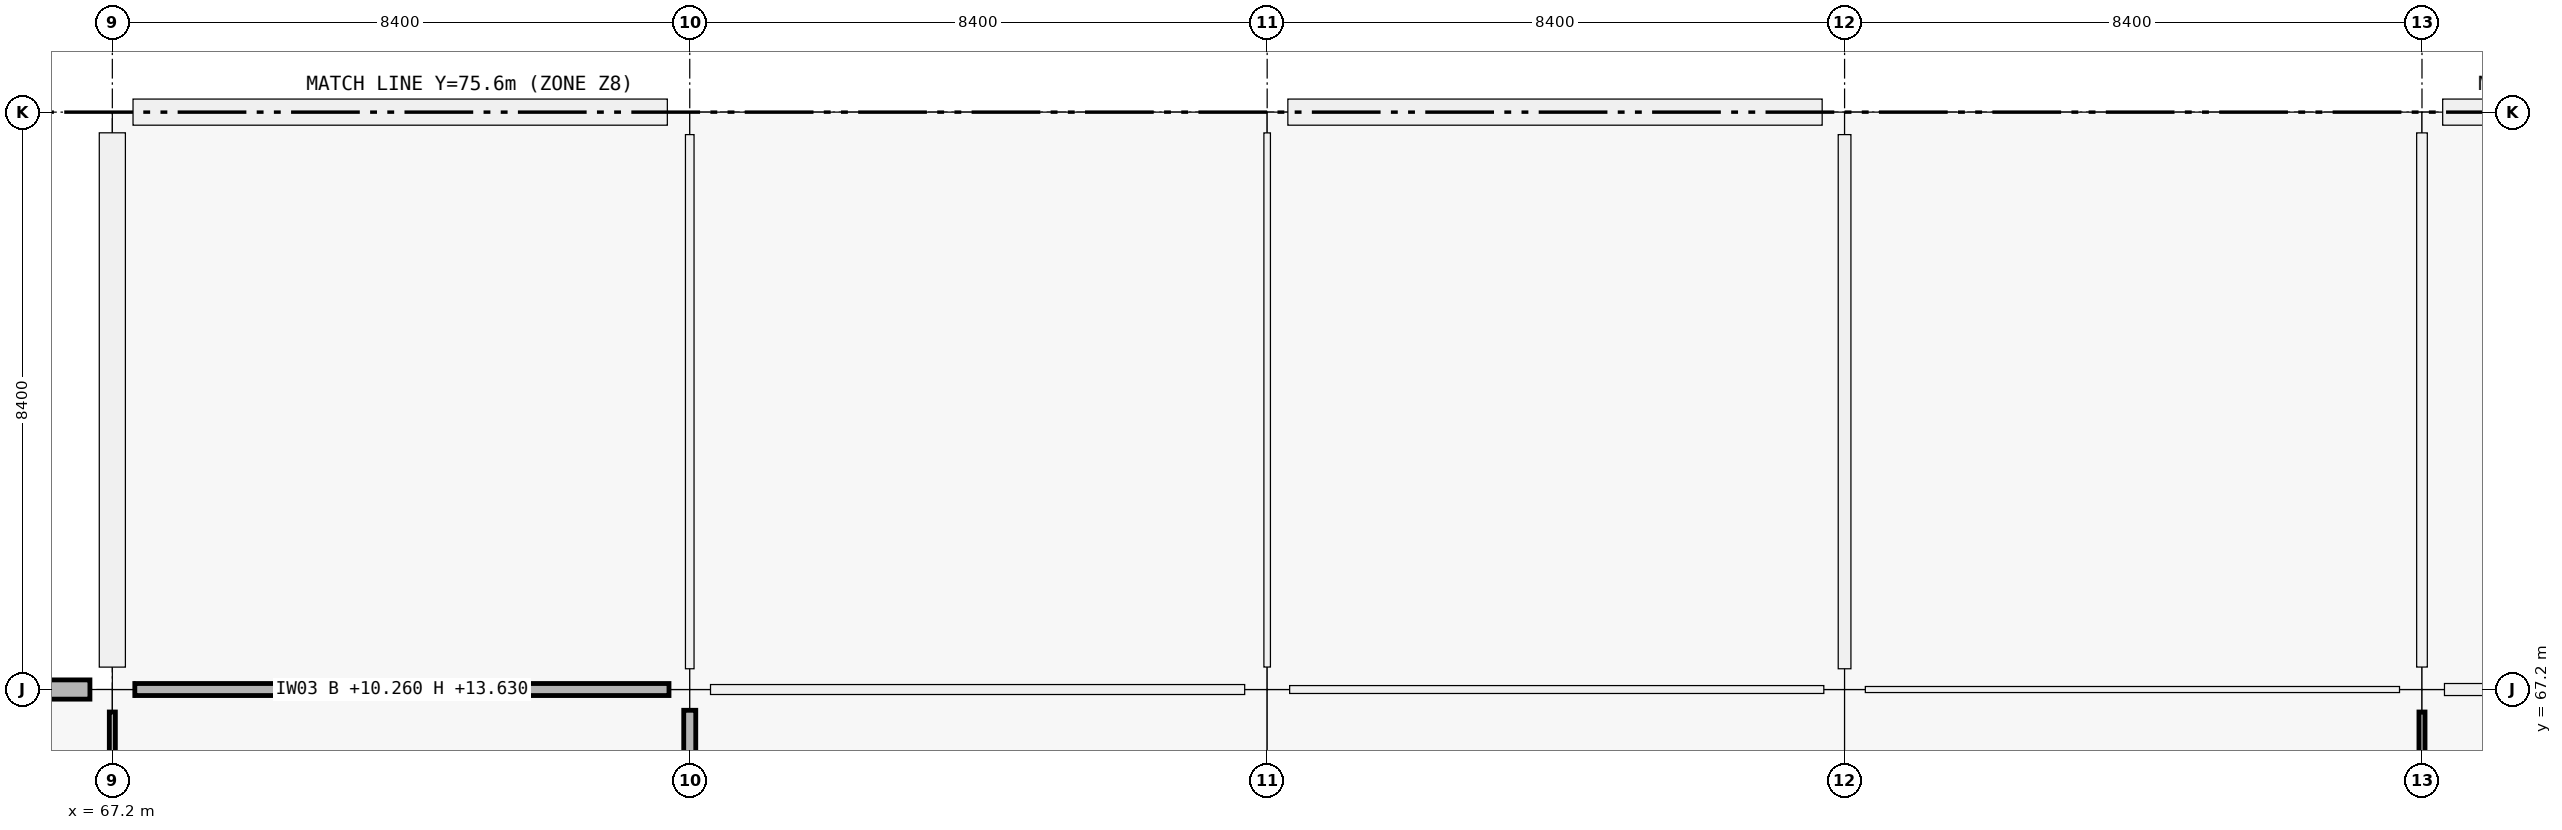
"""IFC4 building model, lengths in metres.
Left out: names, types, materials, properties, quantities, classifications, styles, units other than length and angle.
Written with IfcOpenShell. Run it as: python <this file> out.ifc"""

import sys

from ifc_helpers import new_model, si_unit, direction, frame, frame_2d, origin, origin_2d, place, context, subcontext, project, spatial, rectangle, extrude, element, fill, save


model = new_model("IFC4")
c1 = context("Model", 3, precision=1e-05, world=origin(), true_north=direction((0.0, 1.0)))
c2 = subcontext(c1, "Body", "Model", "MODEL_VIEW")
j1 = project(units=[si_unit("LENGTHUNIT", "METRE"), si_unit("PLANEANGLEUNIT", "RADIAN")], contexts=[c1])
p1 = place(None, origin())
s1 = spatial("IfcSite", under=j1, at=p1, CompositionType="ELEMENT")
p2 = place(p1, origin())
s2 = spatial("IfcBuilding", under=s1, at=p2, CompositionType="ELEMENT")
p3 = place(p2, frame((0.0, 0.0, 10.26)))
s3 = spatial("IfcBuildingStorey", under=s2, at=p3, CompositionType="ELEMENT", Elevation=10.26)
p4 = place(p3, frame((67.2, 67.2, 0.0), z_axis=(0.0, 0.0, 1.0), x_axis=(1.0, 0.0, 0.0)))
e1 = element("IfcColumn", 1, at=p4, inside=s3, PredefinedType="COLUMN", context=c2, shape_type="SweptSolid", body=[
    extrude(rectangle(XDim=0.65, YDim=0.65, at=origin_2d()), origin(), (0.0, 0.0, 1.0), 4.5),
])
for number, where, z_axis, x_axis in (
    (2, (67.2, 75.6, 0.0), (0.0, 0.0, 1.0), (1.0, 0.0, 0.0)),
    (3, (75.6, 67.2, 0.0), (0.0, 0.0, 1.0), (1.0, 0.0, 0.0)),
):
    element("IfcColumn", number, at=place(p3, frame(where, z_axis=z_axis, x_axis=x_axis)), inside=s3, PredefinedType="COLUMN", context=c2, shape_type="SweptSolid", body=[
        extrude(rectangle(XDim=0.6, YDim=0.6, at=origin_2d()), origin(), (0.0, 0.0, 1.0), 4.5),
    ])
for number, where, z_axis, x_axis in (
    (4, (75.6, 75.6, 0.0), (0.0, 0.0, 1.0), (1.0, 0.0, 0.0)),
    (5, (84.0, 67.2, 0.0), (0.0, 0.0, 1.0), (1.0, 0.0, 0.0)),
):
    element("IfcColumn", number, at=place(p3, frame(where, z_axis=z_axis, x_axis=x_axis)), inside=s3, PredefinedType="COLUMN", context=c2, shape_type="SweptSolid", body=[
        extrude(rectangle(XDim=0.65, YDim=0.65, at=origin_2d()), origin(), (0.0, 0.0, 1.0), 4.5),
    ])
for number, where, z_axis, x_axis in (
    (6, (84.0, 75.6, 0.0), (0.0, 0.0, 1.0), (1.0, 0.0, 0.0)),
    (7, (92.4, 67.2, 0.0), (0.0, 0.0, 1.0), (1.0, 0.0, 0.0)),
):
    element("IfcColumn", number, at=place(p3, frame(where, z_axis=z_axis, x_axis=x_axis)), inside=s3, PredefinedType="COLUMN", context=c2, shape_type="SweptSolid", body=[
        extrude(rectangle(XDim=0.6, YDim=0.6, at=origin_2d()), origin(), (0.0, 0.0, 1.0), 4.5),
    ])
for number, where, z_axis, x_axis in (
    (8, (92.4, 75.6, 0.0), (0.0, 0.0, 1.0), (1.0, 0.0, 0.0)),
    (9, (100.8, 67.2, 0.0), (0.0, 0.0, 1.0), (1.0, 0.0, 0.0)),
):
    element("IfcColumn", number, at=place(p3, frame(where, z_axis=z_axis, x_axis=x_axis)), inside=s3, PredefinedType="COLUMN", context=c2, shape_type="SweptSolid", body=[
        extrude(rectangle(XDim=0.65, YDim=0.65, at=origin_2d()), origin(), (0.0, 0.0, 1.0), 4.5),
    ])
p5 = place(p3, frame((100.8, 75.6, 0.0), z_axis=(0.0, 0.0, 1.0), x_axis=(1.0, 0.0, 0.0)))
e10 = element("IfcColumn", 10, at=p5, inside=s3, PredefinedType="COLUMN", context=c2, shape_type="SweptSolid", body=[
    extrude(rectangle(XDim=0.6, YDim=0.6, at=origin_2d()), origin(), (0.0, 0.0, 1.0), 4.5),
])
p6 = place(p3, frame((59.151, 67.2, 0.0), z_axis=(0.0, 0.0, 1.0), x_axis=(1.0, 0.0, 0.0)))
e11 = element("IfcWall", 11, at=p6, inside=s3, PredefinedType="SOLIDWALL", context=c2, shape_type="SweptSolid", body=[
    extrude(rectangle(XDim=7.723, YDim=0.28, at=frame_2d((3.862, 0.0))), origin(), (0.0, 0.0, 1.0), 3.54),
])
p7 = place(p6, frame((2.261, 0.0, 0.9)))
e12 = element("IfcOpeningElement", 12, at=p7, cuts=e11, PredefinedType="OPENING", context=c2, shape_type="SweptSolid", body=[
    extrude(rectangle(XDim=3.2, YDim=1.75, at=frame_2d((1.6, 0.875))), frame((0.0, 0.14, 0.0), z_axis=(0.0, -1.0, 0.0), x_axis=(1.0, 0.0, 0.0)), (0.0, 0.0, 1.0), 0.28),
])
p8 = place(p3, frame((67.2, 67.526, 0.0), z_axis=(0.0, 0.0, 1.0), x_axis=(0.0, 1.0, 0.0)))
e13 = element("IfcWall", 13, at=p8, inside=s3, PredefinedType="SOLIDWALL", context=c2, shape_type="SweptSolid", body=[
    extrude(rectangle(XDim=7.773, YDim=0.38, at=frame_2d((3.887, 0.0))), origin(), (0.0, 0.0, 1.0), 3.54),
])
p9 = place(p3, frame((67.501, 75.6, 0.0), z_axis=(0.0, 0.0, 1.0), x_axis=(1.0, 0.0, 0.0)))
e14 = element("IfcWall", 14, at=p9, inside=s3, PredefinedType="SOLIDWALL", context=c2, shape_type="SweptSolid", body=[
    extrude(rectangle(XDim=7.773, YDim=0.38, at=frame_2d((3.886, 0.0))), origin(), (0.0, 0.0, 1.0), 3.54),
])
p10 = place(p3, frame((84.301, 75.6, 0.0), z_axis=(0.0, 0.0, 1.0), x_axis=(1.0, 0.0, 0.0)))
e15 = element("IfcWall", 15, at=p10, inside=s3, PredefinedType="SOLIDWALL", context=c2, shape_type="SweptSolid", body=[
    extrude(rectangle(XDim=7.773, YDim=0.38, at=frame_2d((3.886, 0.0))), origin(), (0.0, 0.0, 1.0), 3.54),
])
p11 = place(p10, frame((3.136, 0.0, 1.55)))
e16 = element("IfcOpeningElement", 16, at=p11, cuts=e15, PredefinedType="OPENING", context=c2, shape_type="SweptSolid", body=[
    extrude(rectangle(XDim=1.5, YDim=1.2, at=frame_2d((0.75, 0.6))), frame((0.0, 0.19, 0.0), z_axis=(0.0, -1.0, 0.0), x_axis=(1.0, 0.0, 0.0)), (0.0, 0.0, 1.0), 0.38),
])
p12 = place(p3, frame((101.101, 75.6, 0.0), z_axis=(0.0, 0.0, 1.0), x_axis=(1.0, 0.0, 0.0)))
e17 = element("IfcWall", 17, at=p12, inside=s3, PredefinedType="SOLIDWALL", context=c2, shape_type="SweptSolid", body=[
    extrude(rectangle(XDim=7.773, YDim=0.38, at=frame_2d((3.886, 0.0))), origin(), (0.0, 0.0, 1.0), 3.54),
])
p13 = place(p3, frame((67.527, 67.2, 0.0), z_axis=(0.0, 0.0, 1.0), x_axis=(1.0, 0.0, 0.0)))
e18 = element("IfcWall", 18, at=p13, inside=s3, PredefinedType="PARTITIONING", context=c2, shape_type="SweptSolid", body=[
    extrude(rectangle(XDim=7.771, YDim=0.175, at=frame_2d((3.885, 0.0))), origin(), (0.0, 0.0, 1.0), 3.37),
])
p14 = place(p13, frame((3.085, 0.0, 0.0)))
e19 = element("IfcOpeningElement", 19, at=p14, cuts=e18, PredefinedType="OPENING", context=c2, shape_type="SweptSolid", body=[
    extrude(rectangle(XDim=1.6, YDim=2.3, at=frame_2d((0.8, 1.15))), frame((0.0, 0.087, 0.0), z_axis=(0.0, -1.0, 0.0), x_axis=(1.0, 0.0, 0.0)), (0.0, 0.0, 1.0), 0.175),
])
p15 = place(p3, frame((75.902, 67.2, 0.0), z_axis=(0.0, 0.0, 1.0), x_axis=(1.0, 0.0, 0.0)))
e20 = element("IfcWall", 20, at=p15, inside=s3, PredefinedType="PARTITIONING", context=c2, shape_type="SweptSolid", body=[
    extrude(rectangle(XDim=7.771, YDim=0.145, at=frame_2d((3.885, 0.0))), origin(), (0.0, 0.0, 1.0), 3.37),
])
p16 = place(p15, frame((3.16, 0.0, 0.0)))
e21 = element("IfcOpeningElement", 21, at=p16, cuts=e20, PredefinedType="OPENING", context=c2, shape_type="SweptSolid", body=[
    extrude(rectangle(XDim=1.45, YDim=2.2, at=frame_2d((0.725, 1.1))), frame((0.0, 0.073, 0.0), z_axis=(0.0, -1.0, 0.0), x_axis=(1.0, 0.0, 0.0)), (0.0, 0.0, 1.0), 0.145),
])
p17 = place(p3, frame((84.327, 67.2, 0.0), z_axis=(0.0, 0.0, 1.0), x_axis=(1.0, 0.0, 0.0)))
e22 = element("IfcWall", 22, at=p17, inside=s3, PredefinedType="PARTITIONING", context=c2, shape_type="SweptSolid", body=[
    extrude(rectangle(XDim=7.771, YDim=0.115, at=frame_2d((3.885, 0.0))), origin(), (0.0, 0.0, 1.0), 3.37),
])
p18 = place(p17, frame((3.21, 0.0, 0.0)))
e23 = element("IfcOpeningElement", 23, at=p18, cuts=e22, PredefinedType="OPENING", context=c2, shape_type="SweptSolid", body=[
    extrude(rectangle(XDim=1.35, YDim=2.2, at=frame_2d((0.675, 1.1))), frame((0.0, 0.058, 0.0), z_axis=(0.0, -1.0, 0.0), x_axis=(1.0, 0.0, 0.0)), (0.0, 0.0, 1.0), 0.115),
])
p19 = place(p3, frame((92.702, 67.2, 0.0), z_axis=(0.0, 0.0, 1.0), x_axis=(1.0, 0.0, 0.0)))
e24 = element("IfcWall", 24, at=p19, inside=s3, PredefinedType="PARTITIONING", context=c2, shape_type="SweptSolid", body=[
    extrude(rectangle(XDim=7.771, YDim=0.088, at=frame_2d((3.885, 0.0))), origin(), (0.0, 0.0, 1.0), 3.37),
])
p20 = place(p19, frame((3.085, 0.0, 0.0)))
e25 = element("IfcOpeningElement", 25, at=p20, cuts=e24, PredefinedType="OPENING", context=c2, shape_type="SweptSolid", body=[
    extrude(rectangle(XDim=1.6, YDim=2.3, at=frame_2d((0.8, 1.15))), frame((0.0, 0.044, 0.0), z_axis=(0.0, -1.0, 0.0), x_axis=(1.0, 0.0, 0.0)), (0.0, 0.0, 1.0), 0.088),
])
p21 = place(p3, frame((101.127, 67.2, 0.0), z_axis=(0.0, 0.0, 1.0), x_axis=(1.0, 0.0, 0.0)))
e26 = element("IfcWall", 26, at=p21, inside=s3, PredefinedType="PARTITIONING", context=c2, shape_type="SweptSolid", body=[
    extrude(rectangle(XDim=7.771, YDim=0.175, at=frame_2d((3.885, 0.0))), origin(), (0.0, 0.0, 1.0), 3.37),
])
p22 = place(p21, frame((3.186, 0.0, 0.0)))
e27 = element("IfcOpeningElement", 27, at=p22, cuts=e26, PredefinedType="OPENING", context=c2, shape_type="SweptSolid", body=[
    extrude(rectangle(XDim=1.4, YDim=2.25, at=frame_2d((0.7, 1.125))), frame((0.0, 0.087, 0.0), z_axis=(0.0, -1.0, 0.0), x_axis=(1.0, 0.0, 0.0)), (0.0, 0.0, 1.0), 0.175),
])
p23 = place(p3, frame((67.2, 59.102, 0.0), z_axis=(0.0, 0.0, 1.0), x_axis=(0.0, 1.0, 0.0)))
e28 = element("IfcWall", 28, at=p23, inside=s3, PredefinedType="PARTITIONING", context=c2, shape_type="SweptSolid", body=[
    extrude(rectangle(XDim=7.771, YDim=0.088, at=frame_2d((3.885, 0.0))), origin(), (0.0, 0.0, 1.0), 3.37),
])
p24 = place(p23, frame((3.415, 0.0, 0.0)))
e29 = element("IfcOpeningElement", 29, at=p24, cuts=e28, PredefinedType="OPENING", context=c2, shape_type="SweptSolid", body=[
    extrude(rectangle(XDim=0.94, YDim=2.15, at=frame_2d((0.47, 1.075))), frame((0.0, 0.044, 0.0), z_axis=(0.0, -1.0, 0.0), x_axis=(1.0, 0.0, 0.0)), (0.0, 0.0, 1.0), 0.088),
])
p25 = place(p3, frame((75.6, 59.127, 0.0), z_axis=(0.0, 0.0, 1.0), x_axis=(0.0, 1.0, 0.0)))
e30 = element("IfcWall", 30, at=p25, inside=s3, PredefinedType="PARTITIONING", context=c2, shape_type="SweptSolid", body=[
    extrude(rectangle(XDim=7.771, YDim=0.175, at=frame_2d((3.885, 0.0))), origin(), (0.0, 0.0, 1.0), 3.37),
])
p26 = place(p25, frame((2.986, 0.0, 0.0)))
e31 = element("IfcOpeningElement", 31, at=p26, cuts=e30, PredefinedType="OPENING", context=c2, shape_type="SweptSolid", body=[
    extrude(rectangle(XDim=1.8, YDim=2.4, at=frame_2d((0.9, 1.2))), frame((0.0, 0.087, 0.0), z_axis=(0.0, -1.0, 0.0), x_axis=(1.0, 0.0, 0.0)), (0.0, 0.0, 1.0), 0.175),
])
p27 = place(p3, frame((75.6, 67.502, 0.0), z_axis=(0.0, 0.0, 1.0), x_axis=(0.0, 1.0, 0.0)))
e32 = element("IfcWall", 32, at=p27, inside=s3, PredefinedType="PARTITIONING", context=c2, shape_type="SweptSolid", body=[
    extrude(rectangle(XDim=7.771, YDim=0.125, at=frame_2d((3.885, 0.0))), origin(), (0.0, 0.0, 1.0), 3.37),
])
p28 = place(p27, frame((3.425, 0.0, 0.0)))
e33 = element("IfcOpeningElement", 33, at=p28, cuts=e32, PredefinedType="OPENING", context=c2, shape_type="SweptSolid", body=[
    extrude(rectangle(XDim=0.92, YDim=2.15, at=frame_2d((0.46, 1.075))), frame((0.0, 0.062, 0.0), z_axis=(0.0, -1.0, 0.0), x_axis=(1.0, 0.0, 0.0)), (0.0, 0.0, 1.0), 0.125),
])
p29 = place(p3, frame((84.0, 67.527, 0.0), z_axis=(0.0, 0.0, 1.0), x_axis=(0.0, 1.0, 0.0)))
e34 = element("IfcWall", 34, at=p29, inside=s3, PredefinedType="PARTITIONING", context=c2, shape_type="SweptSolid", body=[
    extrude(rectangle(XDim=7.771, YDim=0.095, at=frame_2d((3.885, 0.0))), origin(), (0.0, 0.0, 1.0), 3.37),
])
p30 = place(p29, frame((3.361, 0.0, 0.0)))
e35 = element("IfcOpeningElement", 35, at=p30, cuts=e34, PredefinedType="OPENING", context=c2, shape_type="SweptSolid", body=[
    extrude(rectangle(XDim=1.05, YDim=2.12, at=frame_2d((0.525, 1.06))), frame((0.0, 0.047, 0.0), z_axis=(0.0, -1.0, 0.0), x_axis=(1.0, 0.0, 0.0)), (0.0, 0.0, 1.0), 0.095),
])
p31 = place(p3, frame((92.4, 67.502, 0.0), z_axis=(0.0, 0.0, 1.0), x_axis=(0.0, 1.0, 0.0)))
e36 = element("IfcWall", 36, at=p31, inside=s3, PredefinedType="PARTITIONING", context=c2, shape_type="SweptSolid", body=[
    extrude(rectangle(XDim=7.771, YDim=0.185, at=frame_2d((3.885, 0.0))), origin(), (0.0, 0.0, 1.0), 3.37),
])
p32 = place(p31, frame((3.381, 0.0, 0.0)))
e37 = element("IfcOpeningElement", 37, at=p32, cuts=e36, PredefinedType="OPENING", context=c2, shape_type="SweptSolid", body=[
    extrude(rectangle(XDim=1.01, YDim=2.12, at=frame_2d((0.505, 1.06))), frame((0.0, 0.093, 0.0), z_axis=(0.0, -1.0, 0.0), x_axis=(1.0, 0.0, 0.0)), (0.0, 0.0, 1.0), 0.185),
])
p33 = place(p3, frame((100.8, 59.102, 0.0), z_axis=(0.0, 0.0, 1.0), x_axis=(0.0, 1.0, 0.0)))
e38 = element("IfcWall", 38, at=p33, inside=s3, PredefinedType="PARTITIONING", context=c2, shape_type="SweptSolid", body=[
    extrude(rectangle(XDim=7.771, YDim=0.088, at=frame_2d((3.885, 0.0))), origin(), (0.0, 0.0, 1.0), 3.37),
])
p34 = place(p33, frame((3.085, 0.0, 0.0)))
e39 = element("IfcOpeningElement", 39, at=p34, cuts=e38, PredefinedType="OPENING", context=c2, shape_type="SweptSolid", body=[
    extrude(rectangle(XDim=1.6, YDim=2.3, at=frame_2d((0.8, 1.15))), frame((0.0, 0.044, 0.0), z_axis=(0.0, -1.0, 0.0), x_axis=(1.0, 0.0, 0.0)), (0.0, 0.0, 1.0), 0.088),
])
p35 = place(p3, frame((100.8, 67.527, 0.0), z_axis=(0.0, 0.0, 1.0), x_axis=(0.0, 1.0, 0.0)))
e40 = element("IfcWall", 40, at=p35, inside=s3, PredefinedType="PARTITIONING", context=c2, shape_type="SweptSolid", body=[
    extrude(rectangle(XDim=7.771, YDim=0.155, at=frame_2d((3.885, 0.0))), origin(), (0.0, 0.0, 1.0), 3.37),
])
p36 = place(p35, frame((3.401, 0.0, 0.0)))
e41 = element("IfcOpeningElement", 41, at=p36, cuts=e40, PredefinedType="OPENING", context=c2, shape_type="SweptSolid", body=[
    extrude(rectangle(XDim=0.97, YDim=2.12, at=frame_2d((0.485, 1.06))), frame((0.0, 0.078, 0.0), z_axis=(0.0, -1.0, 0.0), x_axis=(1.0, 0.0, 0.0)), (0.0, 0.0, 1.0), 0.155),
])
p37 = place(p11, origin())
e42 = element("IfcWindow", 42, at=p37, inside=s3, PartitioningType="SINGLE_PANEL", PredefinedType="WINDOW", context=c2, shape_type="SweptSolid", body=[
    extrude(rectangle(XDim=1.5, YDim=1.2, at=frame_2d((0.75, 0.6))), frame((0.0, 0.03, 0.0), z_axis=(0.0, -1.0, 0.0), x_axis=(1.0, 0.0, 0.0)), (0.0, 0.0, 1.0), 0.06),
])
fill(e16, e42)
p38 = place(p14, origin())
e43 = element("IfcDoor", 43, at=p38, inside=s3, OperationType="DOUBLE_DOOR_SINGLE_SWING", PredefinedType="DOOR", context=c2, shape_type="SweptSolid", body=[
    extrude(rectangle(XDim=1.6, YDim=2.3, at=frame_2d((0.8, 1.15))), frame((0.0, 0.025, 0.0), z_axis=(0.0, -1.0, 0.0), x_axis=(1.0, 0.0, 0.0)), (0.0, 0.0, 1.0), 0.05),
])
fill(e19, e43)
p39 = place(p16, origin())
e44 = element("IfcDoor", 44, at=p39, inside=s3, OperationType="DOUBLE_DOOR_SINGLE_SWING", PredefinedType="DOOR", context=c2, shape_type="SweptSolid", body=[
    extrude(rectangle(XDim=1.45, YDim=2.2, at=frame_2d((0.725, 1.1))), frame((0.0, 0.025, 0.0), z_axis=(0.0, -1.0, 0.0), x_axis=(1.0, 0.0, 0.0)), (0.0, 0.0, 1.0), 0.05),
])
fill(e21, e44)
p40 = place(p18, origin())
e45 = element("IfcDoor", 45, at=p40, inside=s3, OperationType="DOUBLE_DOOR_SINGLE_SWING", PredefinedType="DOOR", context=c2, shape_type="SweptSolid", body=[
    extrude(rectangle(XDim=1.35, YDim=2.2, at=frame_2d((0.675, 1.1))), frame((0.0, 0.025, 0.0), z_axis=(0.0, -1.0, 0.0), x_axis=(1.0, 0.0, 0.0)), (0.0, 0.0, 1.0), 0.05),
])
fill(e23, e45)
p41 = place(p20, origin())
e46 = element("IfcDoor", 46, at=p41, inside=s3, OperationType="DOUBLE_DOOR_SINGLE_SWING", PredefinedType="DOOR", context=c2, shape_type="SweptSolid", body=[
    extrude(rectangle(XDim=1.6, YDim=2.3, at=frame_2d((0.8, 1.15))), frame((0.0, 0.025, 0.0), z_axis=(0.0, -1.0, 0.0), x_axis=(1.0, 0.0, 0.0)), (0.0, 0.0, 1.0), 0.05),
])
fill(e25, e46)
p42 = place(p28, origin())
e47 = element("IfcDoor", 47, at=p42, inside=s3, OperationType="SINGLE_SWING_LEFT", PredefinedType="DOOR", context=c2, shape_type="SweptSolid", body=[
    extrude(rectangle(XDim=0.92, YDim=2.15, at=frame_2d((0.46, 1.075))), frame((0.0, 0.025, 0.0), z_axis=(0.0, -1.0, 0.0), x_axis=(1.0, 0.0, 0.0)), (0.0, 0.0, 1.0), 0.05),
])
fill(e33, e47)
p43 = place(p30, origin())
e48 = element("IfcDoor", 48, at=p43, inside=s3, OperationType="SINGLE_SWING_RIGHT", PredefinedType="DOOR", context=c2, shape_type="SweptSolid", body=[
    extrude(rectangle(XDim=1.05, YDim=2.12, at=frame_2d((0.525, 1.06))), frame((0.0, 0.025, 0.0), z_axis=(0.0, -1.0, 0.0), x_axis=(1.0, 0.0, 0.0)), (0.0, 0.0, 1.0), 0.05),
])
fill(e35, e48)
p44 = place(p32, origin())
e49 = element("IfcDoor", 49, at=p44, inside=s3, OperationType="SINGLE_SWING_LEFT", PredefinedType="DOOR", context=c2, shape_type="SweptSolid", body=[
    extrude(rectangle(XDim=1.01, YDim=2.12, at=frame_2d((0.505, 1.06))), frame((0.0, 0.025, 0.0), z_axis=(0.0, -1.0, 0.0), x_axis=(1.0, 0.0, 0.0)), (0.0, 0.0, 1.0), 0.05),
])
fill(e37, e49)
p45 = place(p36, origin())
e50 = element("IfcDoor", 50, at=p45, inside=s3, OperationType="SINGLE_SWING_RIGHT", PredefinedType="DOOR", context=c2, shape_type="SweptSolid", body=[
    extrude(rectangle(XDim=0.97, YDim=2.12, at=frame_2d((0.485, 1.06))), frame((0.0, 0.025, 0.0), z_axis=(0.0, -1.0, 0.0), x_axis=(1.0, 0.0, 0.0)), (0.0, 0.0, 1.0), 0.05),
])
fill(e41, e50)
save(model, sys.argv[1])
